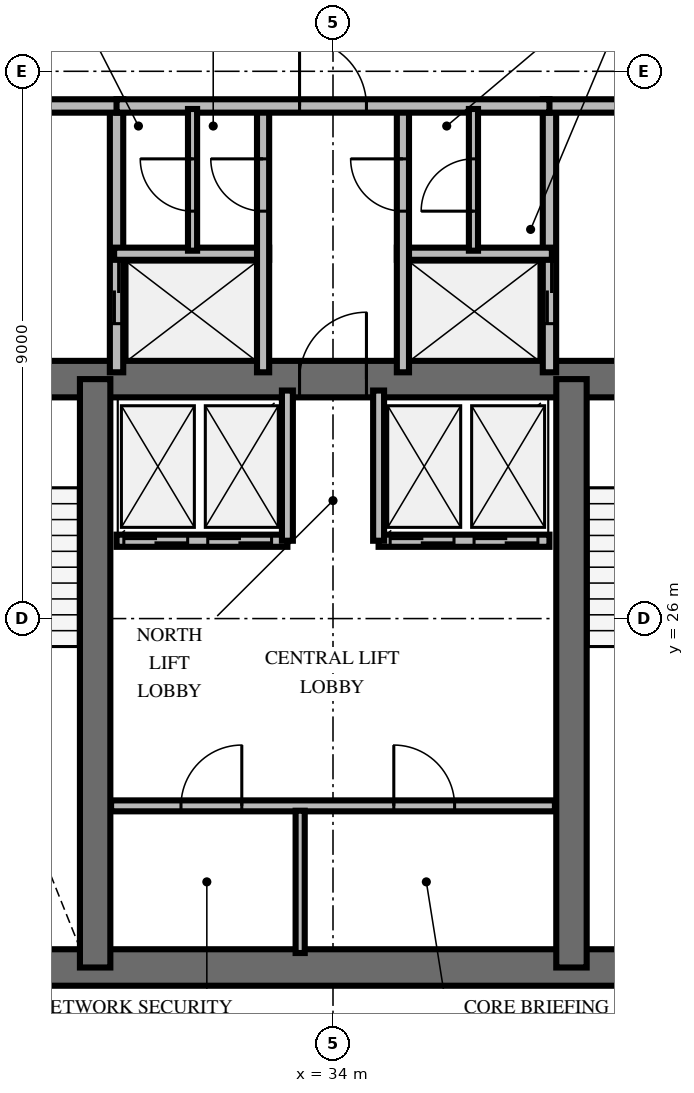
"""IFC4 building model, lengths in metres.
Left out: names, types, materials, properties, quantities, classifications, styles, units other than length and angle.
Written with IfcOpenShell. Run it as: python <this file> out.ifc"""

import sys

from ifc_helpers import new_model, si_unit, direction, frame, frame_2d, origin, place, context, subcontext, project, spatial, rectangle, extrude, element, fill, save


model = new_model("IFC4")
c1 = context("Model", 3, precision=1e-05, world=origin(), true_north=direction((0.0, 1.0)))
c2 = subcontext(c1, "Body", "Model", "MODEL_VIEW")
j1 = project(units=[si_unit("LENGTHUNIT", "METRE"), si_unit("PLANEANGLEUNIT", "RADIAN")], contexts=[c1])
p1 = place(None, origin())
s1 = spatial("IfcSite", under=j1, at=p1, CompositionType="ELEMENT")
p2 = place(p1, origin())
s2 = spatial("IfcBuilding", under=s1, at=p2, CompositionType="ELEMENT")
p3 = place(p2, frame((0.0, 0.0, 244.8)))
s3 = spatial("IfcBuildingStorey", under=s2, at=p3, CompositionType="ELEMENT", Elevation=244.8)
p4 = place(p3, frame((26.222, 20.262, 0.0), z_axis=(0.0, 0.0, 1.0), x_axis=(1.0, 0.0, 0.0)))
e1 = element("IfcWall", 1, at=p4, inside=s3, PredefinedType="SHEAR", context=c2, shape_type="SweptSolid", body=[
    extrude(rectangle(XDim=15.566, YDim=0.6, at=frame_2d((7.783, 0.0))), origin(), (0.0, 0.0, 1.0), 3.6),
])
p5 = place(p3, frame((26.222, 29.938, 0.0), z_axis=(0.0, 0.0, 1.0), x_axis=(1.0, 0.0, 0.0)))
e2 = element("IfcWall", 2, at=p5, inside=s3, PredefinedType="SHEAR", context=c2, shape_type="SweptSolid", body=[
    extrude(rectangle(XDim=15.566, YDim=0.6, at=frame_2d((7.783, 0.0))), origin(), (0.0, 0.0, 1.0), 3.6),
])
p6 = place(p5, frame((0.728, 0.0, 0.0)))
e3 = element("IfcOpeningElement", 3, at=p6, cuts=e2, PredefinedType="OPENING", context=c2, shape_type="SweptSolid", body=[
    extrude(rectangle(XDim=1.05, YDim=2.15, at=frame_2d((0.525, 1.075))), frame((0.0, 0.31, 0.0), z_axis=(0.0, -1.0, 0.0), x_axis=(1.0, 0.0, 0.0)), (0.0, 0.0, 1.0), 0.62),
])
p7 = place(p5, frame((13.778, 0.0, 0.0)))
e4 = element("IfcOpeningElement", 4, at=p7, cuts=e2, PredefinedType="OPENING", context=c2, shape_type="SweptSolid", body=[
    extrude(rectangle(XDim=1.05, YDim=2.15, at=frame_2d((0.525, 1.075))), frame((0.0, 0.31, 0.0), z_axis=(0.0, -1.0, 0.0), x_axis=(1.0, 0.0, 0.0)), (0.0, 0.0, 1.0), 0.62),
])
p8 = place(p5, frame((7.228, 0.0, 0.0)))
e5 = element("IfcOpeningElement", 5, at=p8, cuts=e2, PredefinedType="OPENING", context=c2, shape_type="SweptSolid", body=[
    extrude(rectangle(XDim=1.1, YDim=2.15, at=frame_2d((0.55, 1.075))), frame((0.0, 0.31, 0.0), z_axis=(0.0, -1.0, 0.0), x_axis=(1.0, 0.0, 0.0)), (0.0, 0.0, 1.0), 0.62),
])
for number, where, z_axis, x_axis in (
    (6, (30.088, 20.262, 0.0), (0.0, 0.0, 1.0), (0.0, 1.0, 0.0)),
    (7, (37.922, 20.262, 0.0), (0.0, 0.0, 1.0), (0.0, 1.0, 0.0)),
):
    element("IfcWall", number, at=place(p3, frame(where, z_axis=z_axis, x_axis=x_axis)), inside=s3, PredefinedType="SHEAR", context=c2, shape_type="SweptSolid", body=[
        extrude(rectangle(XDim=9.676, YDim=0.5, at=frame_2d((4.838, 0.0))), origin(), (0.0, 0.0, 1.0), 3.6),
    ])
p9 = place(p3, frame((30.44, 30.05, 0.0), z_axis=(0.0, 0.0, 1.0), x_axis=(0.0, 1.0, 0.0)))
e8 = element("IfcWall", 8, at=p9, inside=s3, PredefinedType="SOLIDWALL", context=c2, shape_type="SweptSolid", body=[
    extrude(rectangle(XDim=4.38, YDim=0.22, at=frame_2d((2.19, 0.0))), origin(), (0.0, 0.0, 1.0), 2.46),
])
p10 = place(p9, frame((0.8, 0.0, 0.0)))
e9 = element("IfcOpeningElement", 9, at=p10, cuts=e8, PredefinedType="OPENING", context=c2, shape_type="SweptSolid", body=[
    extrude(rectangle(XDim=1.05, YDim=2.1, at=frame_2d((0.525, 1.05))), frame((0.0, 0.12, 0.0), z_axis=(0.0, -1.0, 0.0), x_axis=(1.0, 0.0, 0.0)), (0.0, 0.0, 1.0), 0.24),
])
p11 = place(p3, frame((26.24, 34.43, 0.0), z_axis=(0.0, 0.0, 1.0), x_axis=(1.0, 0.0, 0.0)))
e10 = element("IfcWall", 10, at=p11, inside=s3, PredefinedType="SOLIDWALL", context=c2, shape_type="SweptSolid", body=[
    extrude(rectangle(XDim=4.31, YDim=0.22, at=frame_2d((2.155, 0.0))), origin(), (0.0, 0.0, 1.0), 2.46),
])
p12 = place(p11, frame((1.6, 0.0, 0.0)))
e11 = element("IfcOpeningElement", 11, at=p12, cuts=e10, PredefinedType="OPENING", context=c2, shape_type="SweptSolid", body=[
    extrude(rectangle(XDim=1.1, YDim=2.15, at=frame_2d((0.55, 1.075))), frame((0.0, 0.12, 0.0), z_axis=(0.0, -1.0, 0.0), x_axis=(1.0, 0.0, 0.0)), (0.0, 0.0, 1.0), 0.24),
])
p13 = place(p3, frame((30.4, 32.0, 0.0), z_axis=(0.0, 0.0, 1.0), x_axis=(1.0, 0.0, 0.0)))
e12 = element("IfcWall", 12, at=p13, inside=s3, PredefinedType="SOLIDWALL", context=c2, shape_type="SweptSolid", body=[
    extrude(rectangle(XDim=2.55, YDim=0.2, at=frame_2d((1.275, 0.0))), origin(), (0.0, 0.0, 1.0), 2.46),
])
p14 = place(p3, frame((32.85, 30.05, 0.0), z_axis=(0.0, 0.0, 1.0), x_axis=(0.0, 1.0, 0.0)))
e13 = element("IfcWall", 13, at=p14, inside=s3, PredefinedType="SOLIDWALL", context=c2, shape_type="SweptSolid", body=[
    extrude(rectangle(XDim=4.38, YDim=0.2, at=frame_2d((2.19, 0.0))), origin(), (0.0, 0.0, 1.0), 2.46),
])
p15 = place(p14, frame((2.65, 0.0, 0.0)))
e14 = element("IfcOpeningElement", 14, at=p15, cuts=e13, PredefinedType="OPENING", context=c2, shape_type="SweptSolid", body=[
    extrude(rectangle(XDim=0.86, YDim=2.05, at=frame_2d((0.43, 1.025))), frame((0.0, 0.11, 0.0), z_axis=(0.0, -1.0, 0.0), x_axis=(1.0, 0.0, 0.0)), (0.0, 0.0, 1.0), 0.22),
])
p16 = place(p3, frame((37.56, 30.05, 0.0), z_axis=(0.0, 0.0, 1.0), x_axis=(0.0, 1.0, 0.0)))
e15 = element("IfcWall", 15, at=p16, inside=s3, PredefinedType="SOLIDWALL", context=c2, shape_type="SweptSolid", body=[
    extrude(rectangle(XDim=4.38, YDim=0.22, at=frame_2d((2.19, 0.0))), origin(), (0.0, 0.0, 1.0), 2.46),
])
p17 = place(p16, frame((0.8, 0.0, 0.0)))
e16 = element("IfcOpeningElement", 16, at=p17, cuts=e15, PredefinedType="OPENING", context=c2, shape_type="SweptSolid", body=[
    extrude(rectangle(XDim=1.05, YDim=2.1, at=frame_2d((0.525, 1.05))), frame((0.0, 0.12, 0.0), z_axis=(0.0, -1.0, 0.0), x_axis=(1.0, 0.0, 0.0)), (0.0, 0.0, 1.0), 0.24),
])
p18 = place(p3, frame((37.45, 34.43, 0.0), z_axis=(0.0, 0.0, 1.0), x_axis=(1.0, 0.0, 0.0)))
e17 = element("IfcWall", 17, at=p18, inside=s3, PredefinedType="SOLIDWALL", context=c2, shape_type="SweptSolid", body=[
    extrude(rectangle(XDim=4.31, YDim=0.22, at=frame_2d((2.155, 0.0))), origin(), (0.0, 0.0, 1.0), 2.46),
])
p19 = place(p18, frame((1.6, 0.0, 0.0)))
e18 = element("IfcOpeningElement", 18, at=p19, cuts=e17, PredefinedType="OPENING", context=c2, shape_type="SweptSolid", body=[
    extrude(rectangle(XDim=1.1, YDim=2.15, at=frame_2d((0.55, 1.075))), frame((0.0, 0.12, 0.0), z_axis=(0.0, -1.0, 0.0), x_axis=(1.0, 0.0, 0.0)), (0.0, 0.0, 1.0), 0.24),
])
p20 = place(p3, frame((35.05, 32.0, 0.0), z_axis=(0.0, 0.0, 1.0), x_axis=(1.0, 0.0, 0.0)))
e19 = element("IfcWall", 19, at=p20, inside=s3, PredefinedType="SOLIDWALL", context=c2, shape_type="SweptSolid", body=[
    extrude(rectangle(XDim=2.55, YDim=0.2, at=frame_2d((1.275, 0.0))), origin(), (0.0, 0.0, 1.0), 2.46),
])
p21 = place(p3, frame((35.15, 30.05, 0.0), z_axis=(0.0, 0.0, 1.0), x_axis=(0.0, 1.0, 0.0)))
e20 = element("IfcWall", 20, at=p21, inside=s3, PredefinedType="SOLIDWALL", context=c2, shape_type="SweptSolid", body=[
    extrude(rectangle(XDim=4.38, YDim=0.2, at=frame_2d((2.19, 0.0))), origin(), (0.0, 0.0, 1.0), 2.46),
])
p22 = place(p21, frame((2.65, 0.0, 0.0)))
e21 = element("IfcOpeningElement", 21, at=p22, cuts=e20, PredefinedType="OPENING", context=c2, shape_type="SweptSolid", body=[
    extrude(rectangle(XDim=0.86, YDim=2.05, at=frame_2d((0.43, 1.025))), frame((0.0, 0.11, 0.0), z_axis=(0.0, -1.0, 0.0), x_axis=(1.0, 0.0, 0.0)), (0.0, 0.0, 1.0), 0.22),
])
p23 = place(p3, frame((30.44, 34.43, 0.0), z_axis=(0.0, 0.0, 1.0), x_axis=(1.0, 0.0, 0.0)))
e22 = element("IfcWall", 22, at=p23, inside=s3, PredefinedType="SOLIDWALL", context=c2, shape_type="SweptSolid", body=[
    extrude(rectangle(XDim=7.12, YDim=0.22, at=frame_2d((3.56, 0.0))), origin(), (0.0, 0.0, 1.0), 2.46),
])
p24 = place(p23, frame((3.01, 0.0, 0.0)))
e23 = element("IfcOpeningElement", 23, at=p24, cuts=e22, PredefinedType="OPENING", context=c2, shape_type="SweptSolid", body=[
    extrude(rectangle(XDim=1.1, YDim=2.15, at=frame_2d((0.55, 1.075))), frame((0.0, 0.12, 0.0), z_axis=(0.0, -1.0, 0.0), x_axis=(1.0, 0.0, 0.0)), (0.0, 0.0, 1.0), 0.24),
])
p25 = place(p3, frame((31.69, 32.05, 0.0), z_axis=(0.0, 0.0, 1.0), x_axis=(0.0, 1.0, 0.0)))
e24 = element("IfcWall", 24, at=p25, inside=s3, PredefinedType="PARTITIONING", context=c2, shape_type="SweptSolid", body=[
    extrude(rectangle(XDim=2.33, YDim=0.15, at=frame_2d((1.165, 0.0))), origin(), (0.0, 0.0, 1.0), 2.46),
])
p26 = place(p25, frame((0.65, 0.0, 0.0)))
e25 = element("IfcOpeningElement", 25, at=p26, cuts=e24, PredefinedType="OPENING", context=c2, shape_type="SweptSolid", body=[
    extrude(rectangle(XDim=0.86, YDim=2.05, at=frame_2d((0.43, 1.025))), frame((0.0, 0.085, 0.0), z_axis=(0.0, -1.0, 0.0), x_axis=(1.0, 0.0, 0.0)), (0.0, 0.0, 1.0), 0.17),
])
p27 = place(p3, frame((36.31, 32.05, 0.0), z_axis=(0.0, 0.0, 1.0), x_axis=(0.0, 1.0, 0.0)))
e26 = element("IfcWall", 26, at=p27, inside=s3, PredefinedType="PARTITIONING", context=c2, shape_type="SweptSolid", body=[
    extrude(rectangle(XDim=2.33, YDim=0.15, at=frame_2d((1.165, 0.0))), origin(), (0.0, 0.0, 1.0), 2.46),
])
p28 = place(p27, frame((0.65, 0.0, 0.0)))
e27 = element("IfcOpeningElement", 27, at=p28, cuts=e26, PredefinedType="OPENING", context=c2, shape_type="SweptSolid", body=[
    extrude(rectangle(XDim=0.86, YDim=2.05, at=frame_2d((0.43, 1.025))), frame((0.0, 0.085, 0.0), z_axis=(0.0, -1.0, 0.0), x_axis=(1.0, 0.0, 0.0)), (0.0, 0.0, 1.0), 0.17),
])
p29 = place(p3, frame((30.35, 22.92, 0.0), z_axis=(0.0, 0.0, 1.0), x_axis=(1.0, 0.0, 0.0)))
e28 = element("IfcWall", 28, at=p29, inside=s3, PredefinedType="PARTITIONING", context=c2, shape_type="SweptSolid", body=[
    extrude(rectangle(XDim=7.3, YDim=0.18, at=frame_2d((3.65, 0.0))), origin(), (0.0, 0.0, 1.0), 2.46),
])
p30 = place(p29, frame((1.15, 0.0, 0.0)))
e29 = element("IfcOpeningElement", 29, at=p30, cuts=e28, PredefinedType="OPENING", context=c2, shape_type="SweptSolid", body=[
    extrude(rectangle(XDim=1.0, YDim=2.15, at=frame_2d((0.5, 1.075))), frame((0.0, 0.1, 0.0), z_axis=(0.0, -1.0, 0.0), x_axis=(1.0, 0.0, 0.0)), (0.0, 0.0, 1.0), 0.2),
])
p31 = place(p29, frame((4.65, 0.0, 0.0)))
e30 = element("IfcOpeningElement", 30, at=p31, cuts=e28, PredefinedType="OPENING", context=c2, shape_type="SweptSolid", body=[
    extrude(rectangle(XDim=1.0, YDim=2.15, at=frame_2d((0.5, 1.075))), frame((0.0, 0.1, 0.0), z_axis=(0.0, -1.0, 0.0), x_axis=(1.0, 0.0, 0.0)), (0.0, 0.0, 1.0), 0.2),
])
p32 = place(p3, frame((33.46, 20.5, 0.0), z_axis=(0.0, 0.0, 1.0), x_axis=(0.0, 1.0, 0.0)))
e31 = element("IfcWall", 31, at=p32, inside=s3, PredefinedType="PARTITIONING", context=c2, shape_type="SweptSolid", body=[
    extrude(rectangle(XDim=2.34, YDim=0.15, at=frame_2d((1.17, 0.0))), origin(), (0.0, 0.0, 1.0), 2.46),
])
p33 = place(p3, frame((30.44, 27.28, 0.0), z_axis=(0.0, 0.0, 1.0), x_axis=(1.0, 0.0, 0.0)))
e32 = element("IfcWall", 32, at=p33, inside=s3, PredefinedType="SOLIDWALL", context=c2, shape_type="SweptSolid", body=[
    extrude(rectangle(XDim=2.81, YDim=0.2, at=frame_2d((1.405, 0.0))), origin(), (0.0, 0.0, 1.0), 2.46),
])
p34 = place(p33, frame((0.12, 0.0, 0.0)))
e33 = element("IfcOpeningElement", 33, at=p34, cuts=e32, PredefinedType="OPENING", context=c2, shape_type="SweptSolid", body=[
    extrude(rectangle(XDim=1.05, YDim=2.1, at=frame_2d((0.525, 1.05))), frame((0.0, 0.11, 0.0), z_axis=(0.0, -1.0, 0.0), x_axis=(1.0, 0.0, 0.0)), (0.0, 0.0, 1.0), 0.22),
])
p35 = place(p33, frame((1.5, 0.0, 0.0)))
e34 = element("IfcOpeningElement", 34, at=p35, cuts=e32, PredefinedType="OPENING", context=c2, shape_type="SweptSolid", body=[
    extrude(rectangle(XDim=1.05, YDim=2.1, at=frame_2d((0.525, 1.05))), frame((0.0, 0.11, 0.0), z_axis=(0.0, -1.0, 0.0), x_axis=(1.0, 0.0, 0.0)), (0.0, 0.0, 1.0), 0.22),
])
p36 = place(p3, frame((33.25, 27.28, 0.0), z_axis=(0.0, 0.0, 1.0), x_axis=(0.0, 1.0, 0.0)))
e35 = element("IfcWall", 35, at=p36, inside=s3, PredefinedType="SOLIDWALL", context=c2, shape_type="SweptSolid", body=[
    extrude(rectangle(XDim=2.47, YDim=0.18, at=frame_2d((1.235, 0.0))), origin(), (0.0, 0.0, 1.0), 2.46),
])
p37 = place(p3, frame((34.75, 27.28, 0.0), z_axis=(0.0, 0.0, 1.0), x_axis=(1.0, 0.0, 0.0)))
e36 = element("IfcWall", 36, at=p37, inside=s3, PredefinedType="SOLIDWALL", context=c2, shape_type="SweptSolid", body=[
    extrude(rectangle(XDim=2.81, YDim=0.2, at=frame_2d((1.405, 0.0))), origin(), (0.0, 0.0, 1.0), 2.46),
])
p38 = place(p37, frame((0.19, 0.0, 0.0)))
e37 = element("IfcOpeningElement", 37, at=p38, cuts=e36, PredefinedType="OPENING", context=c2, shape_type="SweptSolid", body=[
    extrude(rectangle(XDim=1.05, YDim=2.1, at=frame_2d((0.525, 1.05))), frame((0.0, 0.11, 0.0), z_axis=(0.0, -1.0, 0.0), x_axis=(1.0, 0.0, 0.0)), (0.0, 0.0, 1.0), 0.22),
])
p39 = place(p37, frame((1.57, 0.0, 0.0)))
e38 = element("IfcOpeningElement", 38, at=p39, cuts=e36, PredefinedType="OPENING", context=c2, shape_type="SweptSolid", body=[
    extrude(rectangle(XDim=1.05, YDim=2.1, at=frame_2d((0.525, 1.05))), frame((0.0, 0.11, 0.0), z_axis=(0.0, -1.0, 0.0), x_axis=(1.0, 0.0, 0.0)), (0.0, 0.0, 1.0), 0.22),
])
p40 = place(p3, frame((34.75, 27.28, 0.0), z_axis=(0.0, 0.0, 1.0), x_axis=(0.0, 1.0, 0.0)))
e39 = element("IfcWall", 39, at=p40, inside=s3, PredefinedType="SOLIDWALL", context=c2, shape_type="SweptSolid", body=[
    extrude(rectangle(XDim=2.47, YDim=0.18, at=frame_2d((1.235, 0.0))), origin(), (0.0, 0.0, 1.0), 2.46),
])
p41 = place(p3, frame((27.5, 35.219, 0.0), z_axis=(0.0, 0.0, 1.0), x_axis=(0.953228121756, 0.302251795518, 0.0)))
e40 = element("IfcWall", 40, at=p41, inside=s3, PredefinedType="PARTITIONING", context=c2, shape_type="SweptSolid", body=[
    extrude(rectangle(XDim=6.819, YDim=0.18, at=frame_2d((3.409, 0.0))), origin(), (0.0, 0.0, 1.0), 2.46),
])
p42 = place(p41, frame((2.86, 0.0, 0.0)))
e41 = element("IfcOpeningElement", 41, at=p42, cuts=e40, PredefinedType="OPENING", context=c2, shape_type="SweptSolid", body=[
    extrude(rectangle(XDim=1.1, YDim=2.15, at=frame_2d((0.55, 1.075))), frame((0.0, 0.1, 0.0), z_axis=(0.0, -1.0, 0.0), x_axis=(1.0, 0.0, 0.0)), (0.0, 0.0, 1.0), 0.2),
])
p43 = place(p3, frame((34.0, 37.28, 0.0), z_axis=(0.0, 0.0, 1.0), x_axis=(0.953228121756, -0.302251795518, 0.0)))
e42 = element("IfcWall", 42, at=p43, inside=s3, PredefinedType="PARTITIONING", context=c2, shape_type="SweptSolid", body=[
    extrude(rectangle(XDim=6.819, YDim=0.18, at=frame_2d((3.409, 0.0))), origin(), (0.0, 0.0, 1.0), 2.46),
])
p44 = place(p43, frame((2.86, 0.0, 0.0)))
e43 = element("IfcOpeningElement", 43, at=p44, cuts=e42, PredefinedType="OPENING", context=c2, shape_type="SweptSolid", body=[
    extrude(rectangle(XDim=1.1, YDim=2.15, at=frame_2d((0.55, 1.075))), frame((0.0, 0.1, 0.0), z_axis=(0.0, -1.0, 0.0), x_axis=(1.0, 0.0, 0.0)), (0.0, 0.0, 1.0), 0.2),
])
p45 = place(p8, origin())
e44 = element("IfcDoor", 44, at=p45, inside=s3, OperationType="SINGLE_SWING_RIGHT", PredefinedType="DOOR", context=c2, shape_type="SweptSolid", body=[
    extrude(rectangle(XDim=1.1, YDim=2.15, at=frame_2d((0.55, 1.075))), frame((0.0, 0.025, 0.0), z_axis=(0.0, -1.0, 0.0), x_axis=(1.0, 0.0, 0.0)), (0.0, 0.0, 1.0), 0.05),
])
fill(e5, e44)
p46 = place(p10, origin())
e45 = element("IfcDoor", 45, at=p46, inside=s3, OperationType="DOUBLE_DOOR_SLIDING", PredefinedType="USERDEFINED", context=c2, shape_type="SweptSolid", body=[
    extrude(rectangle(XDim=1.05, YDim=2.1, at=frame_2d((0.525, 1.05))), frame((0.0, 0.025, 0.0), z_axis=(0.0, -1.0, 0.0), x_axis=(1.0, 0.0, 0.0)), (0.0, 0.0, 1.0), 0.05),
])
fill(e9, e45)
p47 = place(p15, origin())
e46 = element("IfcDoor", 46, at=p47, inside=s3, OperationType="SINGLE_SWING_RIGHT", PredefinedType="TRAPDOOR", context=c2, shape_type="SweptSolid", body=[
    extrude(rectangle(XDim=0.86, YDim=2.05, at=frame_2d((0.43, 1.025))), frame((0.0, 0.025, 0.0), z_axis=(0.0, -1.0, 0.0), x_axis=(1.0, 0.0, 0.0)), (0.0, 0.0, 1.0), 0.05),
])
fill(e14, e46)
p48 = place(p17, origin())
e47 = element("IfcDoor", 47, at=p48, inside=s3, OperationType="DOUBLE_DOOR_SLIDING", PredefinedType="USERDEFINED", context=c2, shape_type="SweptSolid", body=[
    extrude(rectangle(XDim=1.05, YDim=2.1, at=frame_2d((0.525, 1.05))), frame((0.0, 0.025, 0.0), z_axis=(0.0, -1.0, 0.0), x_axis=(1.0, 0.0, 0.0)), (0.0, 0.0, 1.0), 0.05),
])
fill(e16, e47)
p49 = place(p22, origin())
e48 = element("IfcDoor", 48, at=p49, inside=s3, OperationType="SINGLE_SWING_RIGHT", PredefinedType="TRAPDOOR", context=c2, shape_type="SweptSolid", body=[
    extrude(rectangle(XDim=0.86, YDim=2.05, at=frame_2d((0.43, 1.025))), frame((0.0, 0.025, 0.0), z_axis=(0.0, -1.0, 0.0), x_axis=(1.0, 0.0, 0.0)), (0.0, 0.0, 1.0), 0.05),
])
fill(e21, e48)
p50 = place(p24, origin())
e49 = element("IfcDoor", 49, at=p50, inside=s3, OperationType="SINGLE_SWING_LEFT", PredefinedType="DOOR", context=c2, shape_type="SweptSolid", body=[
    extrude(rectangle(XDim=1.1, YDim=2.15, at=frame_2d((0.55, 1.075))), frame((0.0, 0.025, 0.0), z_axis=(0.0, -1.0, 0.0), x_axis=(1.0, 0.0, 0.0)), (0.0, 0.0, 1.0), 0.05),
])
fill(e23, e49)
p51 = place(p26, origin())
e50 = element("IfcDoor", 50, at=p51, inside=s3, OperationType="SINGLE_SWING_RIGHT", PredefinedType="TRAPDOOR", context=c2, shape_type="SweptSolid", body=[
    extrude(rectangle(XDim=0.86, YDim=2.05, at=frame_2d((0.43, 1.025))), frame((0.0, 0.025, 0.0), z_axis=(0.0, -1.0, 0.0), x_axis=(1.0, 0.0, 0.0)), (0.0, 0.0, 1.0), 0.05),
])
fill(e25, e50)
p52 = place(p28, origin())
e51 = element("IfcDoor", 51, at=p52, inside=s3, OperationType="SINGLE_SWING_LEFT", PredefinedType="TRAPDOOR", context=c2, shape_type="SweptSolid", body=[
    extrude(rectangle(XDim=0.86, YDim=2.05, at=frame_2d((0.43, 1.025))), frame((0.0, 0.025, 0.0), z_axis=(0.0, -1.0, 0.0), x_axis=(1.0, 0.0, 0.0)), (0.0, 0.0, 1.0), 0.05),
])
fill(e27, e51)
p53 = place(p30, origin())
e52 = element("IfcDoor", 52, at=p53, inside=s3, OperationType="SINGLE_SWING_RIGHT", PredefinedType="DOOR", context=c2, shape_type="SweptSolid", body=[
    extrude(rectangle(XDim=1.0, YDim=2.15, at=frame_2d((0.5, 1.075))), frame((0.0, 0.025, 0.0), z_axis=(0.0, -1.0, 0.0), x_axis=(1.0, 0.0, 0.0)), (0.0, 0.0, 1.0), 0.05),
])
fill(e29, e52)
p54 = place(p31, origin())
e53 = element("IfcDoor", 53, at=p54, inside=s3, OperationType="SINGLE_SWING_LEFT", PredefinedType="DOOR", context=c2, shape_type="SweptSolid", body=[
    extrude(rectangle(XDim=1.0, YDim=2.15, at=frame_2d((0.5, 1.075))), frame((0.0, 0.025, 0.0), z_axis=(0.0, -1.0, 0.0), x_axis=(1.0, 0.0, 0.0)), (0.0, 0.0, 1.0), 0.05),
])
fill(e30, e53)
p55 = place(p34, origin())
e54 = element("IfcDoor", 54, at=p55, inside=s3, OperationType="DOUBLE_DOOR_SLIDING", PredefinedType="USERDEFINED", context=c2, shape_type="SweptSolid", body=[
    extrude(rectangle(XDim=1.05, YDim=2.1, at=frame_2d((0.525, 1.05))), frame((0.0, 0.025, 0.0), z_axis=(0.0, -1.0, 0.0), x_axis=(1.0, 0.0, 0.0)), (0.0, 0.0, 1.0), 0.05),
])
fill(e33, e54)
p56 = place(p35, origin())
e55 = element("IfcDoor", 55, at=p56, inside=s3, OperationType="DOUBLE_DOOR_SLIDING", PredefinedType="USERDEFINED", context=c2, shape_type="SweptSolid", body=[
    extrude(rectangle(XDim=1.05, YDim=2.1, at=frame_2d((0.525, 1.05))), frame((0.0, 0.025, 0.0), z_axis=(0.0, -1.0, 0.0), x_axis=(1.0, 0.0, 0.0)), (0.0, 0.0, 1.0), 0.05),
])
fill(e34, e55)
p57 = place(p38, origin())
e56 = element("IfcDoor", 56, at=p57, inside=s3, OperationType="DOUBLE_DOOR_SLIDING", PredefinedType="USERDEFINED", context=c2, shape_type="SweptSolid", body=[
    extrude(rectangle(XDim=1.05, YDim=2.1, at=frame_2d((0.525, 1.05))), frame((0.0, 0.025, 0.0), z_axis=(0.0, -1.0, 0.0), x_axis=(1.0, 0.0, 0.0)), (0.0, 0.0, 1.0), 0.05),
])
fill(e37, e56)
p58 = place(p39, origin())
e57 = element("IfcDoor", 57, at=p58, inside=s3, OperationType="DOUBLE_DOOR_SLIDING", PredefinedType="USERDEFINED", context=c2, shape_type="SweptSolid", body=[
    extrude(rectangle(XDim=1.05, YDim=2.1, at=frame_2d((0.525, 1.05))), frame((0.0, 0.025, 0.0), z_axis=(0.0, -1.0, 0.0), x_axis=(1.0, 0.0, 0.0)), (0.0, 0.0, 1.0), 0.05),
])
fill(e38, e57)
save(model, sys.argv[1])
